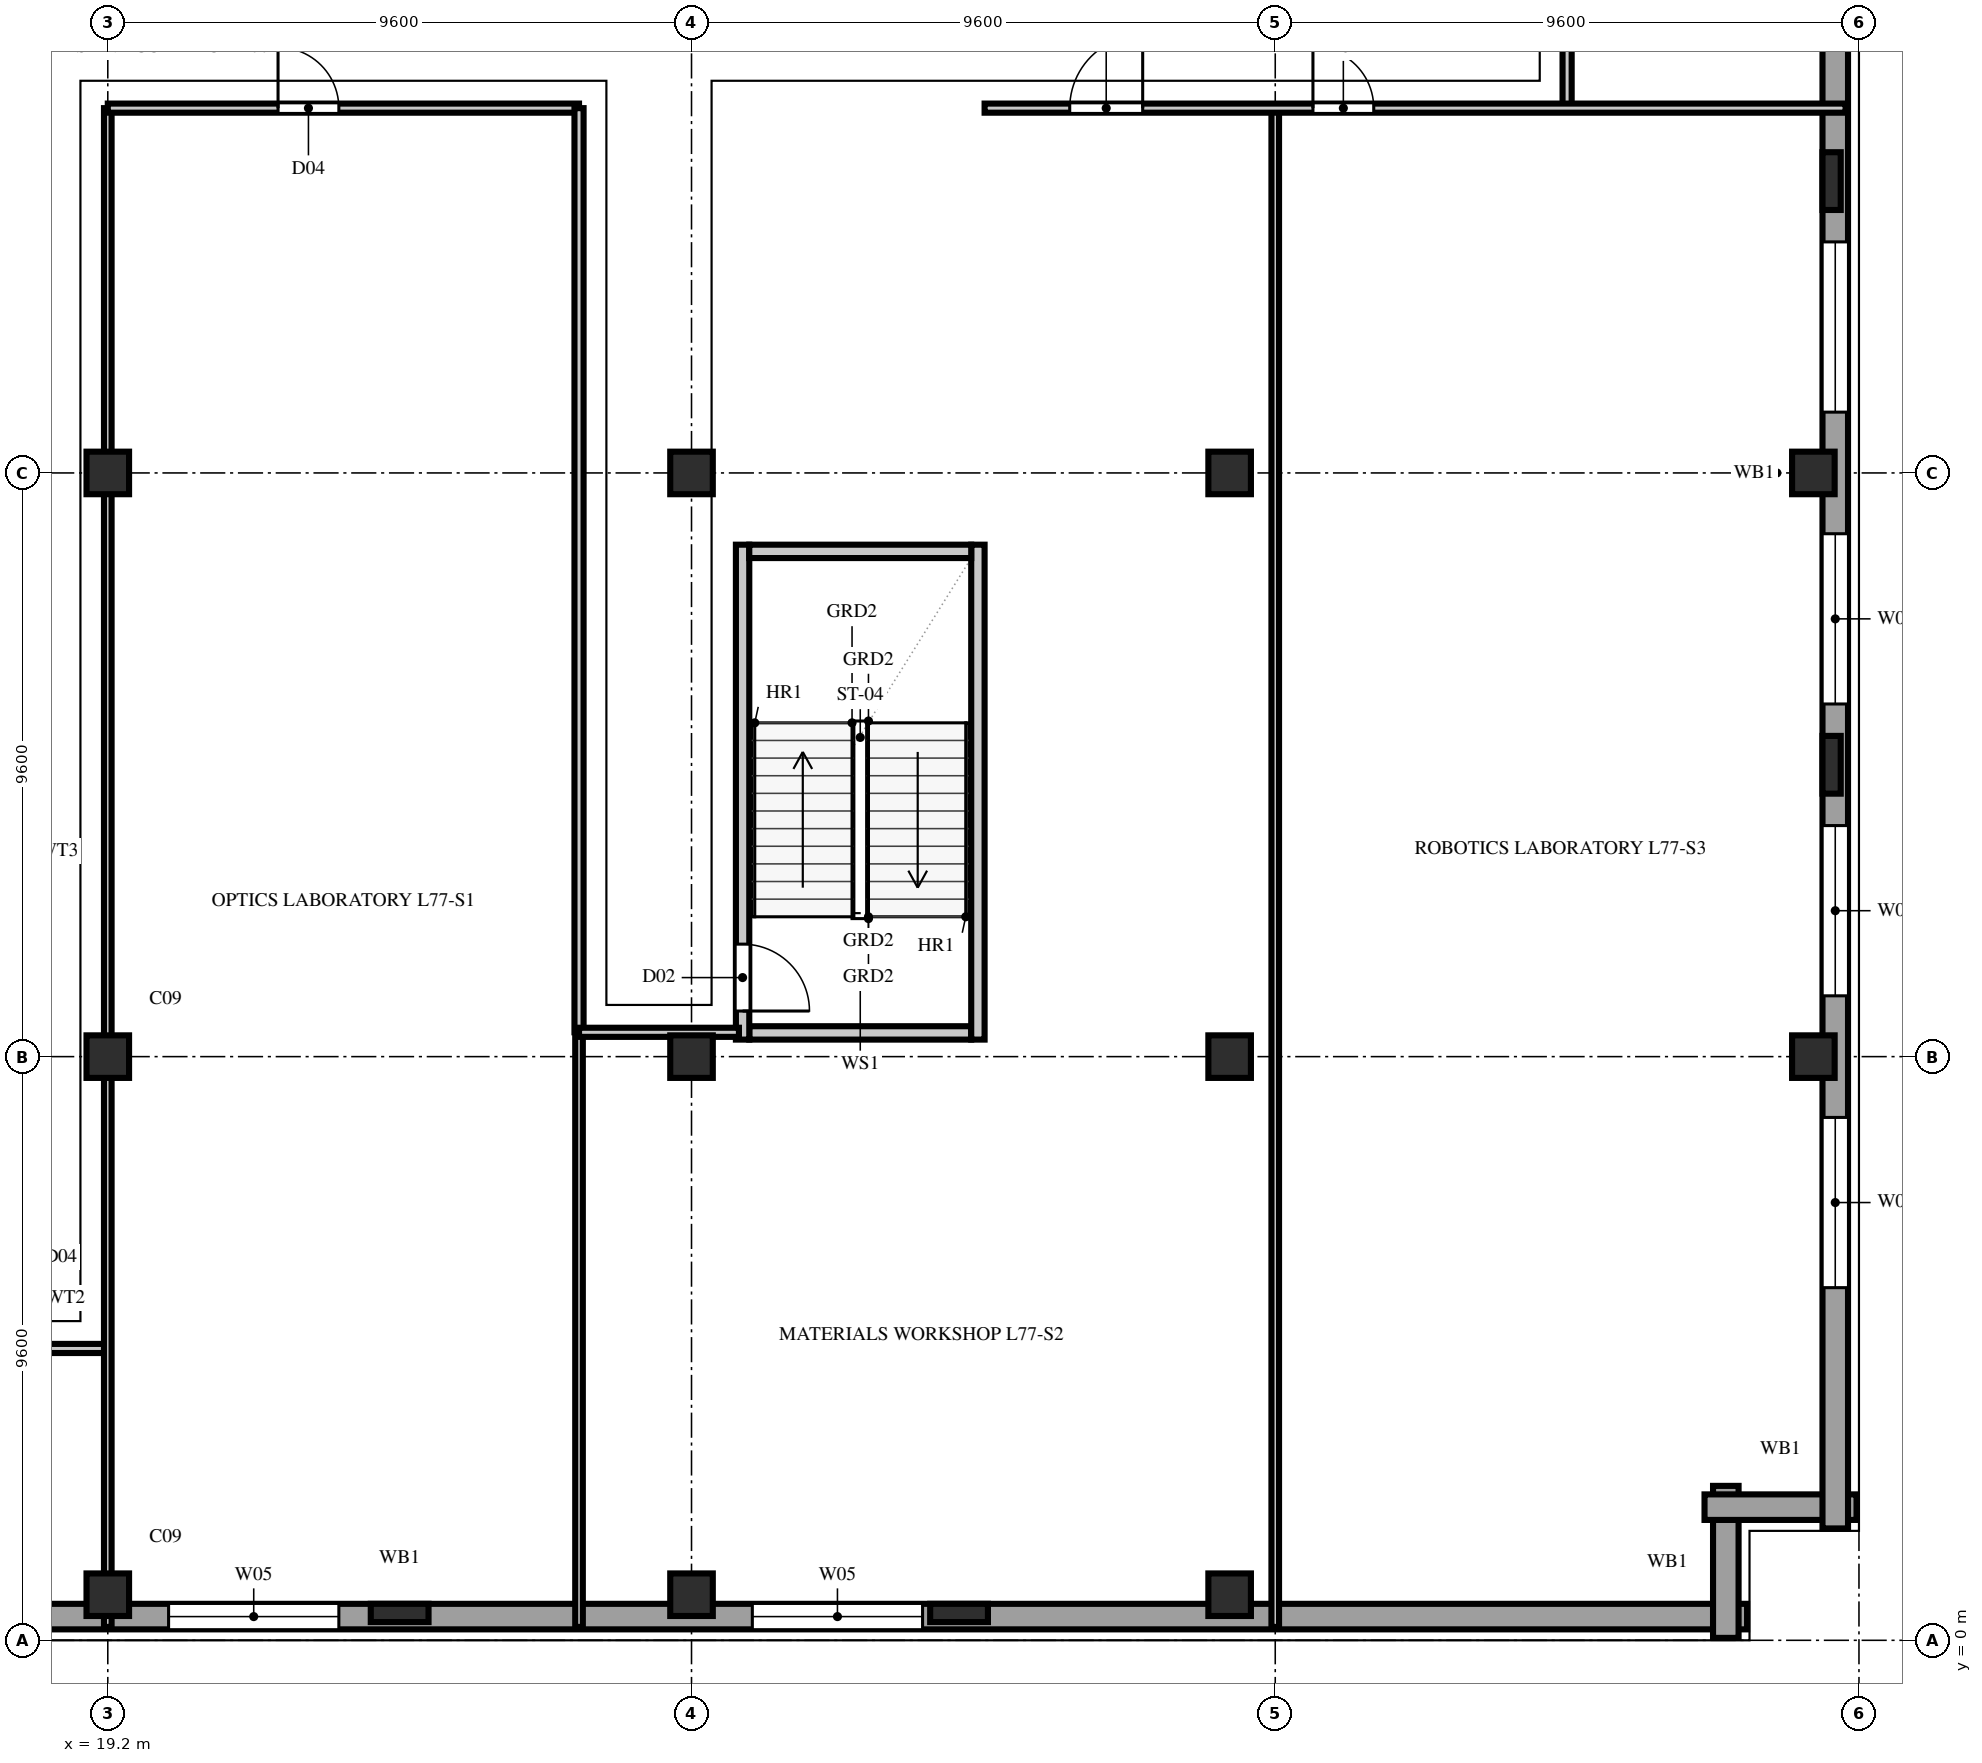
"""IFC4 building model, lengths in metres.
Left out: names, types, materials, properties, quantities, classifications, styles, units other than length and angle.
Written with IfcOpenShell. Run it as: python <this file> out.ifc"""

import sys

from ifc_helpers import new_model, si_unit, direction, frame, frame_2d, origin, origin_2d, place, context, subcontext, project, spatial, rectangle, extrude, element, fill, save


model = new_model("IFC4")
c1 = context("Model", 3, precision=1e-05, world=origin(), true_north=direction((0.0, 1.0)))
c2 = subcontext(c1, "Body", "Model", "MODEL_VIEW")
j1 = project(units=[si_unit("LENGTHUNIT", "METRE"), si_unit("PLANEANGLEUNIT", "RADIAN")], contexts=[c1])
p1 = place(None, origin())
s1 = spatial("IfcSite", under=j1, at=p1, CompositionType="ELEMENT")
p2 = place(p1, origin())
s2 = spatial("IfcBuilding", under=s1, at=p2, CompositionType="ELEMENT")
p3 = place(p2, frame((0.0, 0.0, 303.8)))
s3 = spatial("IfcBuildingStorey", under=s2, at=p3, CompositionType="ELEMENT", Elevation=303.8)
for number, where, z_axis, x_axis in (
    (1, (19.2, 0.75, 0.0), (0.0, 0.0, 1.0), (1.0, 0.0, 0.0)),
    (2, (19.2, 9.6, 0.0), (0.0, 0.0, 1.0), (1.0, 0.0, 0.0)),
    (3, (19.2, 19.2, 0.0), (0.0, 0.0, 1.0), (1.0, 0.0, 0.0)),
    (4, (28.8, 0.75, 0.0), (0.0, 0.0, 1.0), (1.0, 0.0, 0.0)),
    (5, (28.8, 9.6, 0.0), (0.0, 0.0, 1.0), (1.0, 0.0, 0.0)),
    (6, (28.8, 19.2, 0.0), (0.0, 0.0, 1.0), (1.0, 0.0, 0.0)),
    (7, (37.65, 0.75, 0.0), (0.0, 0.0, 1.0), (1.0, 0.0, 0.0)),
    (8, (37.65, 9.6, 0.0), (0.0, 0.0, 1.0), (1.0, 0.0, 0.0)),
    (9, (37.65, 19.2, 0.0), (0.0, 0.0, 1.0), (1.0, 0.0, 0.0)),
    (10, (47.25, 9.6, 0.0), (0.0, 0.0, 1.0), (1.0, 0.0, 0.0)),
    (11, (47.25, 19.2, 0.0), (0.0, 0.0, 1.0), (1.0, 0.0, 0.0)),
):
    element("IfcColumn", number, at=place(p3, frame(where, z_axis=z_axis, x_axis=x_axis)), inside=s3, PredefinedType="COLUMN", context=c2, shape_type="SweptSolid", body=[
        extrude(rectangle(XDim=0.7, YDim=0.7, at=origin_2d()), origin(), (0.0, 0.0, 1.0), 4.2),
    ])
for number, where, z_axis, x_axis in (
    (12, (24.0, 0.45, 0.0), (0.0, 0.0, 1.0), (1.0, 0.0, 0.0)),
    (13, (33.2, 0.45, 0.0), (0.0, 0.0, 1.0), (1.0, 0.0, 0.0)),
    (14, (47.55, 14.4, 0.0), (0.0, 0.0, 1.0), (0.0, 1.0, 0.0)),
    (15, (47.55, 24.0, 0.0), (0.0, 0.0, 1.0), (0.0, 1.0, 0.0)),
):
    element("IfcColumn", number, at=place(p3, frame(where, z_axis=z_axis, x_axis=x_axis)), inside=s3, PredefinedType="PILASTER", context=c2, shape_type="SweptSolid", body=[
        extrude(rectangle(XDim=0.95, YDim=0.3, at=origin_2d()), origin(), (0.0, 0.0, 1.0), 4.2),
    ])
p4 = place(p3, frame((1.84, 0.39, 0.0), z_axis=(0.0, 0.0, 1.0), x_axis=(1.0, 0.0, 0.0)))
e16 = element("IfcWall", 16, at=p4, inside=s3, PredefinedType="SOLIDWALL", context=c2, shape_type="SweptSolid", body=[
    extrude(rectangle(XDim=44.32, YDim=0.42, at=frame_2d((22.16, 0.0))), origin(), (0.0, 0.0, 1.0), 3.88),
])
p5 = place(p4, frame((3.96, 0.0, 0.75)))
e17 = element("IfcOpeningElement", 17, at=p5, cuts=e16, PredefinedType="OPENING", context=c2, shape_type="SweptSolid", body=[
    extrude(rectangle(XDim=2.8, YDim=2.3, at=frame_2d((1.4, 1.15))), frame((0.0, 0.222, 0.0), z_axis=(0.0, -1.0, 0.0), x_axis=(1.0, 0.0, 0.0)), (0.0, 0.0, 1.0), 0.444),
])
p6 = place(p4, frame((8.76, 0.0, 0.75)))
e18 = element("IfcOpeningElement", 18, at=p6, cuts=e16, PredefinedType="OPENING", context=c2, shape_type="SweptSolid", body=[
    extrude(rectangle(XDim=2.8, YDim=2.3, at=frame_2d((1.4, 1.15))), frame((0.0, 0.222, 0.0), z_axis=(0.0, -1.0, 0.0), x_axis=(1.0, 0.0, 0.0)), (0.0, 0.0, 1.0), 0.444),
])
p7 = place(p4, frame((18.36, 0.0, 0.75)))
e19 = element("IfcOpeningElement", 19, at=p7, cuts=e16, PredefinedType="OPENING", context=c2, shape_type="SweptSolid", body=[
    extrude(rectangle(XDim=2.8, YDim=2.3, at=frame_2d((1.4, 1.15))), frame((0.0, 0.222, 0.0), z_axis=(0.0, -1.0, 0.0), x_axis=(1.0, 0.0, 0.0)), (0.0, 0.0, 1.0), 0.444),
])
p8 = place(p4, frame((27.96, 0.0, 0.75)))
e20 = element("IfcOpeningElement", 20, at=p8, cuts=e16, PredefinedType="OPENING", context=c2, shape_type="SweptSolid", body=[
    extrude(rectangle(XDim=2.8, YDim=2.3, at=frame_2d((1.4, 1.15))), frame((0.0, 0.222, 0.0), z_axis=(0.0, -1.0, 0.0), x_axis=(1.0, 0.0, 0.0)), (0.0, 0.0, 1.0), 0.444),
])
for number, where, z_axis, x_axis in (
    (21, (45.81, 0.04, 0.0), (0.0, 0.0, 1.0), (0.0, 1.0, 0.0)),
    (22, (45.46, 2.19, 0.0), (0.0, 0.0, 1.0), (1.0, 0.0, 0.0)),
):
    element("IfcWall", number, at=place(p3, frame(where, z_axis=z_axis, x_axis=x_axis)), inside=s3, PredefinedType="SOLIDWALL", context=c2, shape_type="SweptSolid", body=[
        extrude(rectangle(XDim=2.5, YDim=0.42, at=frame_2d((1.25, 0.0))), origin(), (0.0, 0.0, 1.0), 3.88),
    ])
p9 = place(p3, frame((47.61, 1.84, 0.0), z_axis=(0.0, 0.0, 1.0), x_axis=(0.0, 1.0, 0.0)))
e23 = element("IfcWall", 23, at=p9, inside=s3, PredefinedType="SOLIDWALL", context=c2, shape_type="SweptSolid", body=[
    extrude(rectangle(XDim=34.72, YDim=0.42, at=frame_2d((17.36, 0.0))), origin(), (0.0, 0.0, 1.0), 3.88),
])
p10 = place(p9, frame((3.96, 0.0, 0.75)))
e24 = element("IfcOpeningElement", 24, at=p10, cuts=e23, PredefinedType="OPENING", context=c2, shape_type="SweptSolid", body=[
    extrude(rectangle(XDim=2.8, YDim=2.3, at=frame_2d((1.4, 1.15))), frame((0.0, 0.222, 0.0), z_axis=(0.0, -1.0, 0.0), x_axis=(1.0, 0.0, 0.0)), (0.0, 0.0, 1.0), 0.444),
])
p11 = place(p9, frame((8.76, 0.0, 0.75)))
e25 = element("IfcOpeningElement", 25, at=p11, cuts=e23, PredefinedType="OPENING", context=c2, shape_type="SweptSolid", body=[
    extrude(rectangle(XDim=2.8, YDim=2.3, at=frame_2d((1.4, 1.15))), frame((0.0, 0.222, 0.0), z_axis=(0.0, -1.0, 0.0), x_axis=(1.0, 0.0, 0.0)), (0.0, 0.0, 1.0), 0.444),
])
p12 = place(p9, frame((13.56, 0.0, 0.75)))
e26 = element("IfcOpeningElement", 26, at=p12, cuts=e23, PredefinedType="OPENING", context=c2, shape_type="SweptSolid", body=[
    extrude(rectangle(XDim=2.8, YDim=2.3, at=frame_2d((1.4, 1.15))), frame((0.0, 0.222, 0.0), z_axis=(0.0, -1.0, 0.0), x_axis=(1.0, 0.0, 0.0)), (0.0, 0.0, 1.0), 0.444),
])
p13 = place(p9, frame((18.36, 0.0, 0.75)))
e27 = element("IfcOpeningElement", 27, at=p13, cuts=e23, PredefinedType="OPENING", context=c2, shape_type="SweptSolid", body=[
    extrude(rectangle(XDim=2.8, YDim=2.3, at=frame_2d((1.4, 1.15))), frame((0.0, 0.222, 0.0), z_axis=(0.0, -1.0, 0.0), x_axis=(1.0, 0.0, 0.0)), (0.0, 0.0, 1.0), 0.444),
])
p14 = place(p9, frame((27.96, 0.0, 0.75)))
e28 = element("IfcOpeningElement", 28, at=p14, cuts=e23, PredefinedType="OPENING", context=c2, shape_type="SweptSolid", body=[
    extrude(rectangle(XDim=2.8, YDim=2.3, at=frame_2d((1.4, 1.15))), frame((0.0, 0.222, 0.0), z_axis=(0.0, -1.0, 0.0), x_axis=(1.0, 0.0, 0.0)), (0.0, 0.0, 1.0), 0.444),
])
p15 = place(p3, frame((29.75, 9.99, 0.0), z_axis=(0.0, 0.0, 1.0), x_axis=(1.0, 0.0, 0.0)))
e29 = element("IfcWall", 29, at=p15, inside=s3, PredefinedType="SOLIDWALL", context=c2, shape_type="SweptSolid", body=[
    extrude(rectangle(XDim=3.65, YDim=0.22, at=frame_2d((1.825, 0.0))), origin(), (0.0, 0.0, 1.0), 3.88),
])
p16 = place(p3, frame((29.64, 9.88, 0.0), z_axis=(0.0, 0.0, 1.0), x_axis=(0.0, 1.0, 0.0)))
e30 = element("IfcWall", 30, at=p16, inside=s3, PredefinedType="SOLIDWALL", context=c2, shape_type="SweptSolid", body=[
    extrude(rectangle(XDim=8.14, YDim=0.22, at=frame_2d((4.07, 0.0))), origin(), (0.0, 0.0, 1.0), 3.88),
])
p17 = place(p16, frame((0.47, 0.0, 0.0)))
e31 = element("IfcOpeningElement", 31, at=p17, cuts=e30, PredefinedType="OPENING", context=c2, shape_type="SweptSolid", body=[
    extrude(rectangle(XDim=1.1, YDim=2.2, at=frame_2d((0.55, 1.1))), frame((0.0, 0.122, 0.0), z_axis=(0.0, -1.0, 0.0), x_axis=(1.0, 0.0, 0.0)), (0.0, 0.0, 1.0), 0.244),
])
p18 = place(p3, frame((33.51, 9.88, 0.0), z_axis=(0.0, 0.0, 1.0), x_axis=(0.0, 1.0, 0.0)))
e32 = element("IfcWall", 32, at=p18, inside=s3, PredefinedType="SOLIDWALL", context=c2, shape_type="SweptSolid", body=[
    extrude(rectangle(XDim=8.14, YDim=0.22, at=frame_2d((4.07, 0.0))), origin(), (0.0, 0.0, 1.0), 3.88),
])
p19 = place(p3, frame((29.75, 17.91, 0.0), z_axis=(0.0, 0.0, 1.0), x_axis=(1.0, 0.0, 0.0)))
e33 = element("IfcWall", 33, at=p19, inside=s3, PredefinedType="SOLIDWALL", context=c2, shape_type="SweptSolid", body=[
    extrude(rectangle(XDim=3.65, YDim=0.22, at=frame_2d((1.825, 0.0))), origin(), (0.0, 0.0, 1.0), 3.88),
])
p20 = place(p3, frame((17.05, 4.8, 0.0), z_axis=(0.0, 0.0, 1.0), x_axis=(1.0, 0.0, 0.0)))
e34 = element("IfcWall", 34, at=p20, inside=s3, PredefinedType="PARTITIONING", context=c2, shape_type="SweptSolid", body=[
    extrude(rectangle(XDim=2.15, YDim=0.15, at=frame_2d((1.075, 0.0))), origin(), (0.0, 0.0, 1.0), 3.88),
])
p21 = place(p3, frame((43.2, 25.2, 0.0), z_axis=(0.0, 0.0, 1.0), x_axis=(0.0, 1.0, 0.0)))
e35 = element("IfcWall", 35, at=p21, inside=s3, PredefinedType="PARTITIONING", context=c2, shape_type="SweptSolid", body=[
    extrude(rectangle(XDim=2.1, YDim=0.15, at=frame_2d((1.05, 0.0))), origin(), (0.0, 0.0, 1.0), 3.88),
])
p22 = place(p3, frame((19.2, 0.22, 0.0), z_axis=(0.0, 0.0, 1.0), x_axis=(0.0, 1.0, 0.0)))
e36 = element("IfcWall", 36, at=p22, inside=s3, PredefinedType="PARTITIONING", context=c2, shape_type="SweptSolid", body=[
    extrude(rectangle(XDim=0.53, YDim=0.125, at=frame_2d((0.265, 0.0))), origin(), (0.0, 0.0, 1.0), 3.88),
])
p23 = place(p3, frame((19.2, 0.75, 0.0), z_axis=(0.0, 0.0, 1.0), x_axis=(0.0, 1.0, 0.0)))
e37 = element("IfcWall", 37, at=p23, inside=s3, PredefinedType="PARTITIONING", context=c2, shape_type="SweptSolid", body=[
    extrude(rectangle(XDim=24.45, YDim=0.125, at=frame_2d((12.225, 0.0))), origin(), (0.0, 0.0, 1.0), 3.572),
])
p24 = place(p3, frame((19.2, 25.2, 0.0), z_axis=(0.0, 0.0, 1.0), x_axis=(1.0, 0.0, 0.0)))
e38 = element("IfcWall", 38, at=p24, inside=s3, PredefinedType="PARTITIONING", context=c2, shape_type="SweptSolid", body=[
    extrude(rectangle(XDim=7.75, YDim=0.15, at=frame_2d((3.875, 0.0))), origin(), (0.0, 0.0, 1.0), 3.88),
])
p25 = place(p24, frame((2.8, 0.0, 0.0)))
e39 = element("IfcOpeningElement", 39, at=p25, cuts=e38, PredefinedType="OPENING", context=c2, shape_type="SweptSolid", body=[
    extrude(rectangle(XDim=1.0, YDim=2.2, at=frame_2d((0.5, 1.1))), frame((0.0, 0.087, 0.0), z_axis=(0.0, -1.0, 0.0), x_axis=(1.0, 0.0, 0.0)), (0.0, 0.0, 1.0), 0.174),
])
p26 = place(p3, frame((26.95, 0.22, 0.0), z_axis=(0.0, 0.0, 1.0), x_axis=(0.0, 1.0, 0.0)))
e40 = element("IfcWall", 40, at=p26, inside=s3, PredefinedType="PARTITIONING", context=c2, shape_type="SweptSolid", body=[
    extrude(rectangle(XDim=9.78, YDim=0.125, at=frame_2d((4.89, 0.0))), origin(), (0.0, 0.0, 1.0), 3.88),
])
p27 = place(p3, frame((26.95, 10.0, 0.0), z_axis=(0.0, 0.0, 1.0), x_axis=(0.0, 1.0, 0.0)))
e41 = element("IfcWall", 41, at=p27, inside=s3, PredefinedType="PARTITIONING", context=c2, shape_type="SweptSolid", body=[
    extrude(rectangle(XDim=15.2, YDim=0.15, at=frame_2d((7.6, 0.0))), origin(), (0.0, 0.0, 1.0), 3.88),
])
p28 = place(p3, frame((26.95, 10.0, 0.0), z_axis=(0.0, 0.0, 1.0), x_axis=(1.0, 0.0, 0.0)))
e42 = element("IfcWall", 42, at=p28, inside=s3, PredefinedType="PARTITIONING", context=c2, shape_type="SweptSolid", body=[
    extrude(rectangle(XDim=2.63, YDim=0.15, at=frame_2d((1.315, 0.0))), origin(), (0.0, 0.0, 1.0), 3.88),
])
p29 = place(p3, frame((38.4, 0.22, 0.0), z_axis=(0.0, 0.0, 1.0), x_axis=(0.0, 1.0, 0.0)))
e43 = element("IfcWall", 43, at=p29, inside=s3, PredefinedType="PARTITIONING", context=c2, shape_type="SweptSolid", body=[
    extrude(rectangle(XDim=24.98, YDim=0.125, at=frame_2d((12.49, 0.0))), origin(), (0.0, 0.0, 1.0), 3.88),
])
p30 = place(p3, frame((33.62, 25.2, 0.0), z_axis=(0.0, 0.0, 1.0), x_axis=(1.0, 0.0, 0.0)))
e44 = element("IfcWall", 44, at=p30, inside=s3, PredefinedType="PARTITIONING", context=c2, shape_type="SweptSolid", body=[
    extrude(rectangle(XDim=14.16, YDim=0.15, at=frame_2d((7.08, 0.0))), origin(), (0.0, 0.0, 1.0), 3.88),
])
p31 = place(p30, frame((1.4, 0.0, 0.0)))
e45 = element("IfcOpeningElement", 45, at=p31, cuts=e44, PredefinedType="OPENING", context=c2, shape_type="SweptSolid", body=[
    extrude(rectangle(XDim=1.2, YDim=2.2, at=frame_2d((0.6, 1.1))), frame((0.0, 0.087, 0.0), z_axis=(0.0, -1.0, 0.0), x_axis=(1.0, 0.0, 0.0)), (0.0, 0.0, 1.0), 0.174),
])
p32 = place(p30, frame((5.4, 0.0, 0.0)))
e46 = element("IfcOpeningElement", 46, at=p32, cuts=e44, PredefinedType="OPENING", context=c2, shape_type="SweptSolid", body=[
    extrude(rectangle(XDim=1.0, YDim=2.2, at=frame_2d((0.5, 1.1))), frame((0.0, 0.087, 0.0), z_axis=(0.0, -1.0, 0.0), x_axis=(1.0, 0.0, 0.0)), (0.0, 0.0, 1.0), 0.174),
])
p33 = place(p7, origin())
e47 = element("IfcWindow", 47, at=p33, inside=s3, PartitioningType="TRIPLE_PANEL_VERTICAL", PredefinedType="WINDOW", context=c2, shape_type="SweptSolid", body=[
    extrude(rectangle(XDim=2.8, YDim=2.3, at=frame_2d((1.4, 1.15))), frame((0.0, 0.11, 0.0), z_axis=(0.0, -1.0, 0.0), x_axis=(1.0, 0.0, 0.0)), (0.0, 0.0, 1.0), 0.06),
])
fill(e19, e47)
p34 = place(p8, origin())
e48 = element("IfcWindow", 48, at=p34, inside=s3, PartitioningType="TRIPLE_PANEL_VERTICAL", PredefinedType="WINDOW", context=c2, shape_type="SweptSolid", body=[
    extrude(rectangle(XDim=2.8, YDim=2.3, at=frame_2d((1.4, 1.15))), frame((0.0, 0.11, 0.0), z_axis=(0.0, -1.0, 0.0), x_axis=(1.0, 0.0, 0.0)), (0.0, 0.0, 1.0), 0.06),
])
fill(e20, e48)
p35 = place(p10, origin())
e49 = element("IfcWindow", 49, at=p35, inside=s3, PartitioningType="TRIPLE_PANEL_VERTICAL", PredefinedType="WINDOW", context=c2, shape_type="SweptSolid", body=[
    extrude(rectangle(XDim=2.8, YDim=2.3, at=frame_2d((1.4, 1.15))), frame((0.0, 0.11, 0.0), z_axis=(0.0, -1.0, 0.0), x_axis=(1.0, 0.0, 0.0)), (0.0, 0.0, 1.0), 0.06),
])
fill(e24, e49)
p36 = place(p11, origin())
e50 = element("IfcWindow", 50, at=p36, inside=s3, PartitioningType="TRIPLE_PANEL_VERTICAL", PredefinedType="WINDOW", context=c2, shape_type="SweptSolid", body=[
    extrude(rectangle(XDim=2.8, YDim=2.3, at=frame_2d((1.4, 1.15))), frame((0.0, 0.11, 0.0), z_axis=(0.0, -1.0, 0.0), x_axis=(1.0, 0.0, 0.0)), (0.0, 0.0, 1.0), 0.06),
])
fill(e25, e50)
p37 = place(p12, origin())
e51 = element("IfcWindow", 51, at=p37, inside=s3, PartitioningType="TRIPLE_PANEL_VERTICAL", PredefinedType="WINDOW", context=c2, shape_type="SweptSolid", body=[
    extrude(rectangle(XDim=2.8, YDim=2.3, at=frame_2d((1.4, 1.15))), frame((0.0, 0.11, 0.0), z_axis=(0.0, -1.0, 0.0), x_axis=(1.0, 0.0, 0.0)), (0.0, 0.0, 1.0), 0.06),
])
fill(e26, e51)
p38 = place(p13, origin())
e52 = element("IfcWindow", 52, at=p38, inside=s3, PartitioningType="TRIPLE_PANEL_VERTICAL", PredefinedType="WINDOW", context=c2, shape_type="SweptSolid", body=[
    extrude(rectangle(XDim=2.8, YDim=2.3, at=frame_2d((1.4, 1.15))), frame((0.0, 0.11, 0.0), z_axis=(0.0, -1.0, 0.0), x_axis=(1.0, 0.0, 0.0)), (0.0, 0.0, 1.0), 0.06),
])
fill(e27, e52)
p39 = place(p17, frame((1.1, 0.0, 0.0), z_axis=(0.0, 0.0, 1.0), x_axis=(-1.0, 0.0, 0.0)))
e53 = element("IfcDoor", 53, at=p39, inside=s3, OperationType="SINGLE_SWING_RIGHT", PredefinedType="DOOR", context=c2, shape_type="SweptSolid", body=[
    extrude(rectangle(XDim=1.1, YDim=2.2, at=frame_2d((0.55, 1.1))), frame((0.0, 0.025, 0.0), z_axis=(0.0, -1.0, 0.0), x_axis=(1.0, 0.0, 0.0)), (0.0, 0.0, 1.0), 0.05),
])
fill(e31, e53)
p40 = place(p25, origin())
e54 = element("IfcDoor", 54, at=p40, inside=s3, OperationType="SINGLE_SWING_LEFT", PredefinedType="DOOR", context=c2, shape_type="SweptSolid", body=[
    extrude(rectangle(XDim=1.0, YDim=2.2, at=frame_2d((0.5, 1.1))), frame((0.0, 0.025, 0.0), z_axis=(0.0, -1.0, 0.0), x_axis=(1.0, 0.0, 0.0)), (0.0, 0.0, 1.0), 0.05),
])
fill(e39, e54)
p41 = place(p31, origin())
e55 = element("IfcDoor", 55, at=p41, inside=s3, OperationType="SINGLE_SWING_RIGHT", PredefinedType="DOOR", context=c2, shape_type="SweptSolid", body=[
    extrude(rectangle(XDim=1.2, YDim=2.2, at=frame_2d((0.6, 1.1))), frame((0.0, 0.025, 0.0), z_axis=(0.0, -1.0, 0.0), x_axis=(1.0, 0.0, 0.0)), (0.0, 0.0, 1.0), 0.05),
])
fill(e45, e55)
p42 = place(p32, origin())
e56 = element("IfcDoor", 56, at=p42, inside=s3, OperationType="SINGLE_SWING_LEFT", PredefinedType="DOOR", context=c2, shape_type="SweptSolid", body=[
    extrude(rectangle(XDim=1.0, YDim=2.2, at=frame_2d((0.5, 1.1))), frame((0.0, 0.025, 0.0), z_axis=(0.0, -1.0, 0.0), x_axis=(1.0, 0.0, 0.0)), (0.0, 0.0, 1.0), 0.05),
])
fill(e46, e56)
save(model, sys.argv[1])
